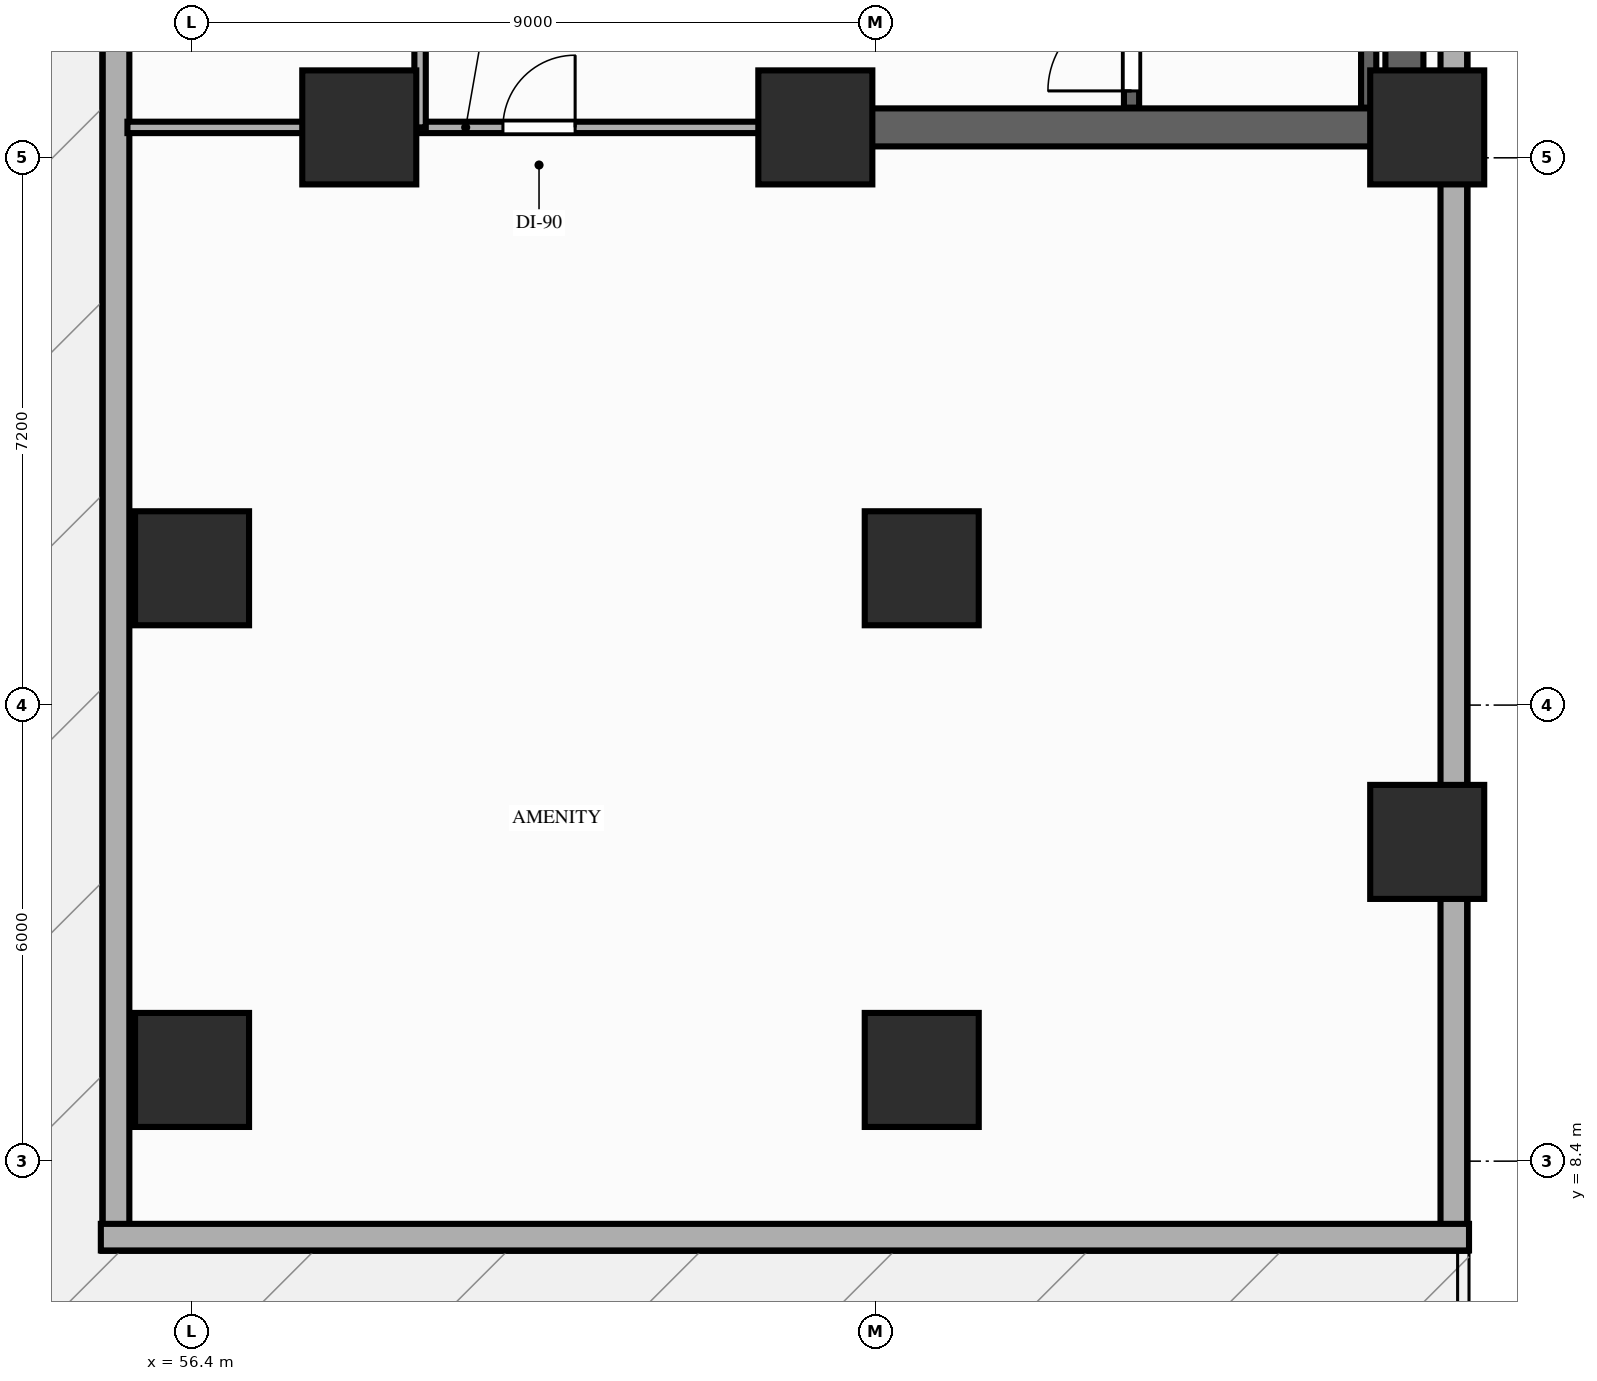
"""IFC4 building model, lengths in metres.
Left out: names, types, materials, properties, quantities, classifications, styles, units other than length and angle.
Written with IfcOpenShell. Run it as: python <this file> out.ifc"""

import sys

from ifc_helpers import new_model, si_unit, direction, frame, frame_2d, origin, origin_2d, place, context, subcontext, project, spatial, rectangle, extrude, element, fill, save


model = new_model("IFC4")
c1 = context("Model", 3, precision=1e-05, world=origin(), true_north=direction((0.0, 1.0)))
c2 = subcontext(c1, "Body", "Model", "MODEL_VIEW")
j1 = project(units=[si_unit("LENGTHUNIT", "METRE"), si_unit("PLANEANGLEUNIT", "RADIAN")], contexts=[c1])
p1 = place(None, origin())
s1 = spatial("IfcSite", under=j1, at=p1, CompositionType="ELEMENT")
p2 = place(p1, origin())
s2 = spatial("IfcBuilding", under=s1, at=p2, CompositionType="ELEMENT")
p3 = place(p2, frame((0.0, 0.0, 21.8)))
s3 = spatial("IfcBuildingStorey", under=s2, at=p3, CompositionType="ELEMENT", Elevation=21.8)
for number, where, z_axis, x_axis in (
    (1, (64.6, 22.0, 0.0), (0.0, 0.0, 1.0), (1.0, 0.0, 0.0)),
    (2, (72.65, 22.0, 0.0), (0.0, 0.0, 1.0), (1.0, 0.0, 0.0)),
):
    element("IfcColumn", number, at=place(p3, frame(where, z_axis=z_axis, x_axis=x_axis)), inside=s3, PredefinedType="COLUMN", context=c2, shape_type="SweptSolid", body=[
        extrude(rectangle(XDim=1.5, YDim=1.5, at=origin_2d()), origin(), (0.0, 0.0, 1.0), 4.6),
    ])
p4 = place(p3, frame((58.6, 22.0, 0.0), z_axis=(0.0, 0.0, 1.0), x_axis=(1.0, 0.0, 0.0)))
e3 = element("IfcColumn", 3, at=p4, inside=s3, PredefinedType="COLUMN", context=c2, shape_type="SweptSolid", body=[
    extrude(rectangle(XDim=1.5, YDim=1.5, at=origin_2d()), origin(), (0.0, 0.0, 1.0), 4.05),
])
for number, where, z_axis, x_axis in (
    (4, (56.4, 9.6, 0.0), (0.0, 0.0, 1.0), (1.0, 0.0, 0.0)),
    (5, (66.0, 9.6, 0.0), (0.0, 0.0, 1.0), (1.0, 0.0, 0.0)),
    (6, (56.4, 16.2, 0.0), (0.0, 0.0, 1.0), (1.0, 0.0, 0.0)),
    (7, (66.0, 16.2, 0.0), (0.0, 0.0, 1.0), (1.0, 0.0, 0.0)),
    (8, (72.65, 12.6, 0.0), (0.0, 0.0, 1.0), (1.0, 0.0, 0.0)),
):
    element("IfcColumn", number, at=place(p3, frame(where, z_axis=z_axis, x_axis=x_axis)), inside=s3, PredefinedType="COLUMN", context=c2, shape_type="SweptSolid", body=[
        extrude(rectangle(XDim=1.5, YDim=1.5, at=origin_2d()), origin(), (0.0, 0.0, 1.0), 4.6),
    ])
p5 = place(p3, frame((55.4, 43.55, 0.0), z_axis=(0.0, 0.0, 1.0), x_axis=(0.0, -1.0, 0.0)))
e9 = element("IfcWall", 9, at=p5, inside=s3, PredefinedType="STANDARD", context=c2, shape_type="SweptSolid", body=[
    extrude(rectangle(XDim=36.1, YDim=0.35, at=frame_2d((18.05, 0.0))), origin(), (0.0, 0.0, 1.0), 4.36),
])
p6 = place(p5, frame((12.6, 0.0, 0.0)))
e10 = element("IfcOpeningElement", 10, at=p6, cuts=e9, PredefinedType="OPENING", context=c2, shape_type="SweptSolid", body=[
    extrude(rectangle(XDim=1.6, YDim=2.15, at=frame_2d((0.8, 1.075))), frame((0.0, 0.185, 0.0), z_axis=(0.0, -1.0, 0.0), x_axis=(1.0, 0.0, 0.0)), (0.0, 0.0, 1.0), 0.37),
])
p7 = place(p3, frame((73.0, 7.45, 0.0), z_axis=(0.0, 0.0, 1.0), x_axis=(0.0, 1.0, 0.0)))
e11 = element("IfcWall", 11, at=p7, inside=s3, PredefinedType="STANDARD", context=c2, shape_type="SweptSolid", body=[
    extrude(rectangle(XDim=36.1, YDim=0.35, at=frame_2d((18.05, 0.0))), origin(), (0.0, 0.0, 1.0), 3.84),
])
p8 = place(p3, frame((55.2, 7.4, 0.0), z_axis=(0.0, 0.0, 1.0), x_axis=(1.0, 0.0, 0.0)))
e12 = element("IfcWall", 12, at=p8, inside=s3, PredefinedType="STANDARD", context=c2, shape_type="SweptSolid", body=[
    extrude(rectangle(XDim=18.0, YDim=0.35, at=frame_2d((9.0, 0.0))), origin(), (0.0, 0.0, 1.0), 4.36),
])
p9 = place(p3, frame((72.35, 22.0, 0.0), z_axis=(0.0, 0.0, 1.0), x_axis=(0.0, 1.0, 0.0)))
e13 = element("IfcWall", 13, at=p9, inside=s3, PredefinedType="SHEAR", context=c2, shape_type="SweptSolid", body=[
    extrude(rectangle(XDim=20.25, YDim=0.5, at=frame_2d((10.125, 0.0))), origin(), (0.0, 0.0, 1.0), 4.36),
])
p10 = place(p3, frame((64.6, 22.0, 0.0), z_axis=(0.0, 0.0, 1.0), x_axis=(1.0, 0.0, 0.0)))
e14 = element("IfcWall", 14, at=p10, inside=s3, PredefinedType="SHEAR", context=c2, shape_type="SweptSolid", body=[
    extrude(rectangle(XDim=7.5, YDim=0.5, at=frame_2d((3.75, 0.0))), origin(), (0.0, 0.0, 1.0), 4.36),
])
p11 = place(p3, frame((68.76, 22.26, 0.0), z_axis=(0.0, 0.0, 1.0), x_axis=(0.0, 1.0, 0.0)))
e15 = element("IfcWall", 15, at=p11, inside=s3, PredefinedType="SHEAR", context=c2, shape_type="SweptSolid", body=[
    extrude(rectangle(XDim=7.82, YDim=0.2, at=frame_2d((3.91, 0.0))), origin(), (0.0, 0.0, 1.0), 4.36),
])
p12 = place(p11, frame((0.22, 0.0, 0.0)))
e16 = element("IfcOpeningElement", 16, at=p12, cuts=e15, PredefinedType="OPENING", context=c2, shape_type="SweptSolid", body=[
    extrude(rectangle(XDim=1.1, YDim=2.15, at=frame_2d((0.55, 1.075))), frame((0.0, 0.11, 0.0), z_axis=(0.0, -1.0, 0.0), x_axis=(1.0, 0.0, 0.0)), (0.0, 0.0, 1.0), 0.22),
])
p13 = place(p3, frame((71.88, 22.26, 0.0), z_axis=(0.0, 0.0, 1.0), x_axis=(0.0, 1.0, 0.0)))
e17 = element("IfcWall", 17, at=p13, inside=s3, PredefinedType="SHEAR", context=c2, shape_type="SweptSolid", body=[
    extrude(rectangle(XDim=7.82, YDim=0.2, at=frame_2d((3.91, 0.0))), origin(), (0.0, 0.0, 1.0), 4.36),
])
p14 = place(p3, frame((55.55, 22.0, 0.0), z_axis=(0.0, 0.0, 1.0), x_axis=(1.0, 0.0, 0.0)))
e18 = element("IfcWall", 18, at=p14, inside=s3, PredefinedType="PARTITIONING", context=c2, shape_type="SweptSolid", body=[
    extrude(rectangle(XDim=8.9, YDim=0.15, at=frame_2d((4.45, 0.0))), origin(), (0.0, 0.0, 1.0), 2.34),
])
p15 = place(p14, frame((4.94, 0.0, 0.0)))
e19 = element("IfcOpeningElement", 19, at=p15, cuts=e18, PredefinedType="OPENING", context=c2, shape_type="SweptSolid", body=[
    extrude(rectangle(XDim=0.95, YDim=2.15, at=frame_2d((0.475, 1.075))), frame((0.0, 0.085, 0.0), z_axis=(0.0, -1.0, 0.0), x_axis=(1.0, 0.0, 0.0)), (0.0, 0.0, 1.0), 0.17),
])
p16 = place(p3, frame((59.4, 22.0, 0.0), z_axis=(0.0, 0.0, 1.0), x_axis=(0.0, 1.0, 0.0)))
e20 = element("IfcWall", 20, at=p16, inside=s3, PredefinedType="PARTITIONING", context=c2, shape_type="SweptSolid", body=[
    extrude(rectangle(XDim=6.8, YDim=0.15, at=frame_2d((3.4, 0.0))), origin(), (0.0, 0.0, 1.0), 3.84),
])
p17 = place(p12, origin())
e21 = element("IfcDoor", 21, at=p17, inside=s3, OperationType="SINGLE_SWING_LEFT", PredefinedType="DOOR", context=c2, shape_type="SweptSolid", body=[
    extrude(rectangle(XDim=1.1, YDim=2.15, at=frame_2d((0.55, 1.075))), frame((0.0, 0.025, 0.0), z_axis=(0.0, -1.0, 0.0), x_axis=(1.0, 0.0, 0.0)), (0.0, 0.0, 1.0), 0.05),
])
fill(e16, e21)
p18 = place(p15, origin())
e22 = element("IfcDoor", 22, at=p18, inside=s3, OperationType="SINGLE_SWING_RIGHT", PredefinedType="DOOR", context=c2, shape_type="SweptSolid", body=[
    extrude(rectangle(XDim=0.95, YDim=2.15, at=frame_2d((0.475, 1.075))), frame((0.0, 0.025, 0.0), z_axis=(0.0, -1.0, 0.0), x_axis=(1.0, 0.0, 0.0)), (0.0, 0.0, 1.0), 0.05),
])
fill(e19, e22)
save(model, sys.argv[1])
